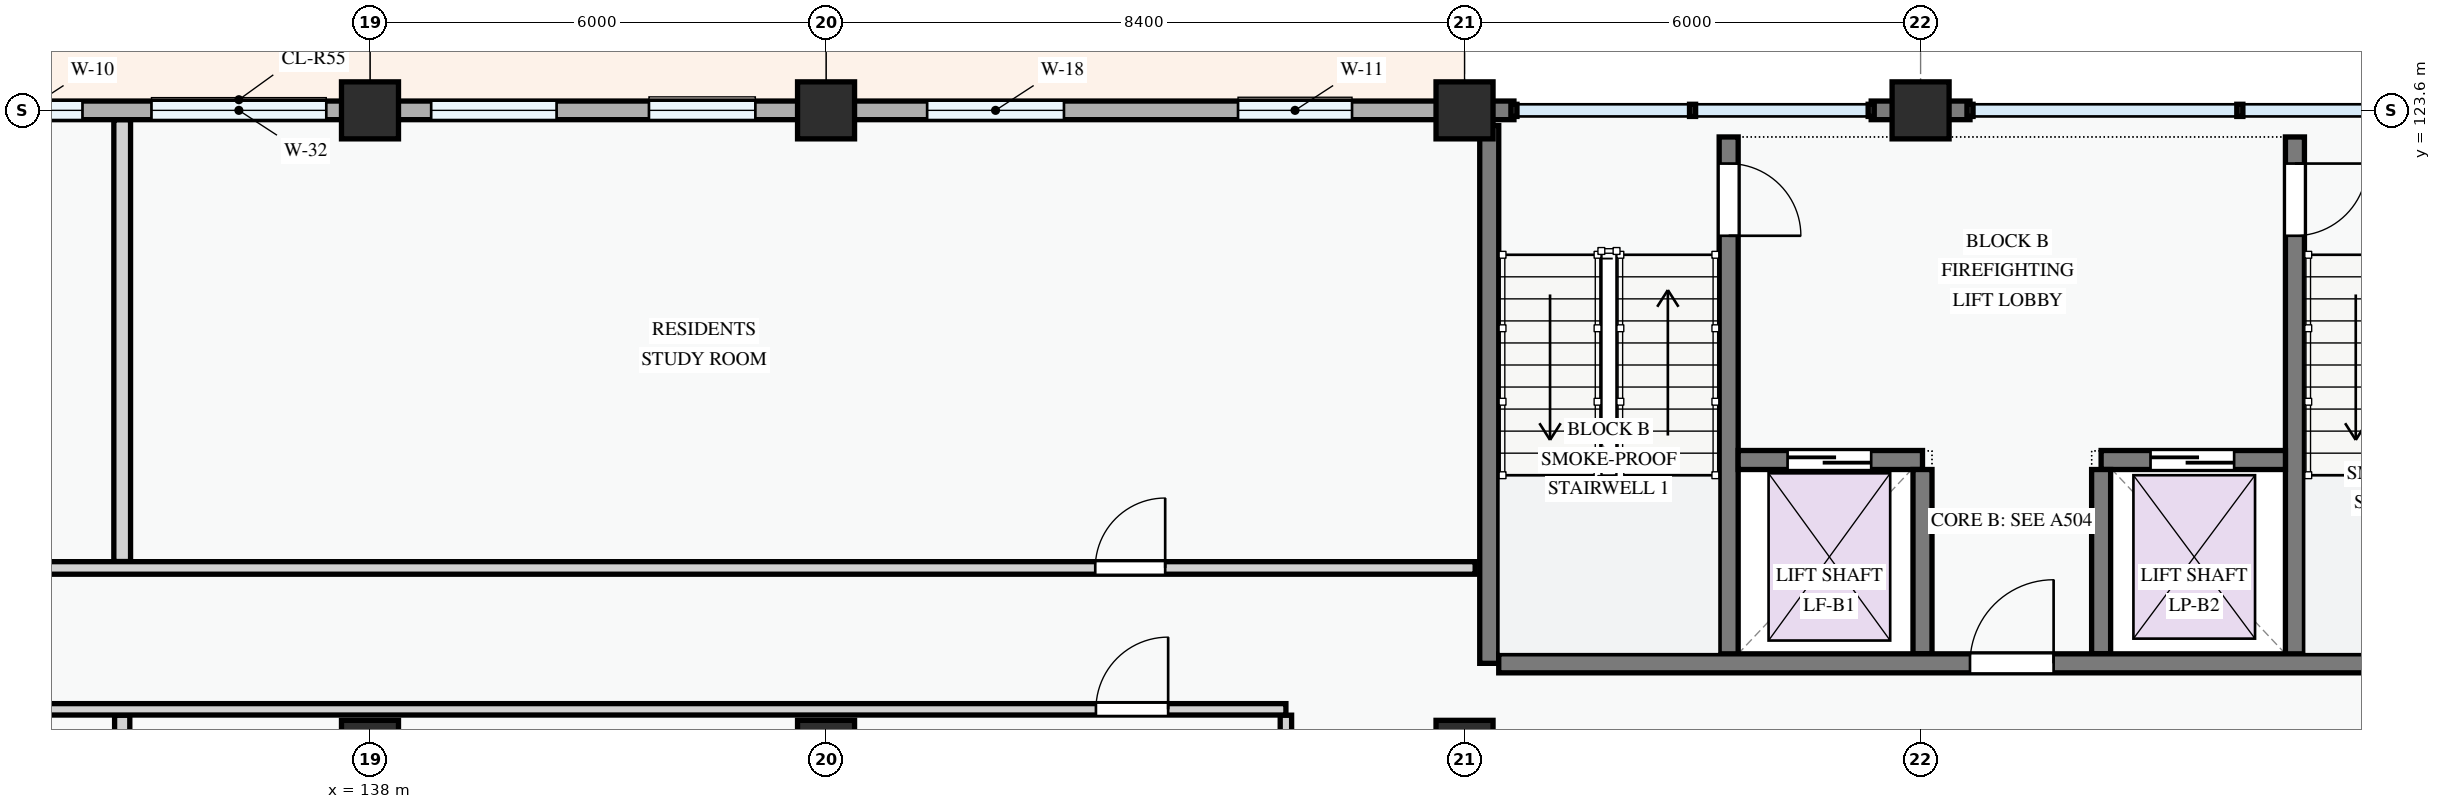
"""IFC4 building model, lengths in metres.
Left out: names, types, materials, properties, quantities, classifications, styles, units other than length and angle.
Written with IfcOpenShell. Run it as: python <this file> out.ifc"""

import sys

from ifc_helpers import new_model, si_unit, direction, frame, frame_2d, origin, origin_2d, place, context, subcontext, project, spatial, rectangle, extrude, element, fill, save


model = new_model("IFC4")
c1 = context("Model", 3, precision=1e-05, world=origin(), true_north=direction((0.0, 1.0)))
c2 = subcontext(c1, "Body", "Model", "MODEL_VIEW")
j1 = project(units=[si_unit("LENGTHUNIT", "METRE"), si_unit("PLANEANGLEUNIT", "RADIAN")], contexts=[c1])
p1 = place(None, origin())
s1 = spatial("IfcSite", under=j1, at=p1, CompositionType="ELEMENT")
p2 = place(p1, origin())
s2 = spatial("IfcBuilding", under=s1, at=p2, CompositionType="ELEMENT")
p3 = place(p2, frame((0.0, 0.0, 4.5)))
s3 = spatial("IfcBuildingStorey", under=s2, at=p3, CompositionType="ELEMENT", Elevation=4.5)
for number, where, z_axis, x_axis in (
    (1, (138.0, 115.2, 0.0), (0.0, 0.0, 1.0), (1.0, 0.0, 0.0)),
    (2, (138.0, 123.6, 0.0), (0.0, 0.0, 1.0), (1.0, 0.0, 0.0)),
    (3, (144.0, 115.2, 0.0), (0.0, 0.0, 1.0), (1.0, 0.0, 0.0)),
    (4, (144.0, 123.6, 0.0), (0.0, 0.0, 1.0), (1.0, 0.0, 0.0)),
    (5, (152.4, 115.2, 0.0), (0.0, 0.0, 1.0), (1.0, 0.0, 0.0)),
    (6, (152.4, 123.6, 0.0), (0.0, 0.0, 1.0), (1.0, 0.0, 0.0)),
    (7, (158.4, 123.6, 0.0), (0.0, 0.0, 1.0), (1.0, 0.0, 0.0)),
):
    element("IfcColumn", number, at=place(p3, frame(where, z_axis=z_axis, x_axis=x_axis)), inside=s3, PredefinedType="COLUMN", context=c2, shape_type="SweptSolid", body=[
        extrude(rectangle(XDim=0.75, YDim=0.75, at=origin_2d()), origin(), (0.0, 0.0, 1.0), 3.6),
    ])
p4 = place(p3, frame((159.05, 123.6, 0.0), z_axis=(0.0, 0.0, 1.0), x_axis=(-1.0, 0.0, 0.0)))
e8 = element("IfcWall", 8, at=p4, inside=s3, PredefinedType="STANDARD", context=c2, shape_type="SweptSolid", body=[
    extrude(rectangle(XDim=0.65, YDim=0.245, at=frame_2d((0.325, 0.0))), origin(), (0.0, 0.0, 1.0), 3.34),
])
p5 = place(p3, frame((158.4, 123.6, 0.0), z_axis=(0.0, 0.0, 1.0), x_axis=(-1.0, 0.0, 0.0)))
e9 = element("IfcWall", 9, at=p5, inside=s3, PredefinedType="STANDARD", context=c2, shape_type="SweptSolid", body=[
    extrude(rectangle(XDim=0.65, YDim=0.245, at=frame_2d((0.325, 0.0))), origin(), (0.0, 0.0, 1.0), 3.34),
])
p6 = place(p3, frame((153.05, 123.6, 0.0), z_axis=(0.0, 0.0, 1.0), x_axis=(-1.0, 0.0, 0.0)))
e10 = element("IfcWall", 10, at=p6, inside=s3, PredefinedType="STANDARD", context=c2, shape_type="SweptSolid", body=[
    extrude(rectangle(XDim=0.65, YDim=0.245, at=frame_2d((0.325, 0.0))), origin(), (0.0, 0.0, 1.0), 3.34),
])
p7 = place(p3, frame((152.4, 123.6, 0.0), z_axis=(0.0, 0.0, 1.0), x_axis=(-1.0, 0.0, 0.0)))
e11 = element("IfcWall", 11, at=p7, inside=s3, PredefinedType="STANDARD", context=c2, shape_type="SweptSolid", body=[
    extrude(rectangle(XDim=8.4, YDim=0.245, at=frame_2d((4.2, 0.0))), origin(), (0.0, 0.0, 1.0), 2.675),
])
p8 = place(p7, frame((1.48, 0.0, 0.78)))
e12 = element("IfcOpeningElement", 12, at=p8, cuts=e11, PredefinedType="OPENING", context=c2, shape_type="SweptSolid", body=[
    extrude(rectangle(XDim=1.5, YDim=1.65, at=frame_2d((0.75, 0.825))), frame((0.0, 0.133, 0.0), z_axis=(0.0, -1.0, 0.0), x_axis=(1.0, 0.0, 0.0)), (0.0, 0.0, 1.0), 0.265),
])
p9 = place(p7, frame((5.27, 0.0, 0.78)))
e13 = element("IfcOpeningElement", 13, at=p9, cuts=e11, PredefinedType="OPENING", context=c2, shape_type="SweptSolid", body=[
    extrude(rectangle(XDim=1.8, YDim=1.5, at=frame_2d((0.9, 0.75))), frame((0.0, 0.133, 0.0), z_axis=(0.0, -1.0, 0.0), x_axis=(1.0, 0.0, 0.0)), (0.0, 0.0, 1.0), 0.265),
])
p10 = place(p3, frame((144.0, 123.6, 0.0), z_axis=(0.0, 0.0, 1.0), x_axis=(-1.0, 0.0, 0.0)))
e14 = element("IfcWall", 14, at=p10, inside=s3, PredefinedType="STANDARD", context=c2, shape_type="SweptSolid", body=[
    extrude(rectangle(XDim=6.0, YDim=0.245, at=frame_2d((3.0, 0.0))), origin(), (0.0, 0.0, 1.0), 2.775),
])
p11 = place(p10, frame((0.93, 0.0, 0.78)))
e15 = element("IfcOpeningElement", 15, at=p11, cuts=e14, PredefinedType="OPENING", context=c2, shape_type="SweptSolid", body=[
    extrude(rectangle(XDim=1.4, YDim=1.45, at=frame_2d((0.7, 0.725))), frame((0.0, 0.133, 0.0), z_axis=(0.0, -1.0, 0.0), x_axis=(1.0, 0.0, 0.0)), (0.0, 0.0, 1.0), 0.265),
])
p12 = place(p10, frame((3.545, 0.0, 0.78)))
e16 = element("IfcOpeningElement", 16, at=p12, cuts=e14, PredefinedType="OPENING", context=c2, shape_type="SweptSolid", body=[
    extrude(rectangle(XDim=1.65, YDim=1.5, at=frame_2d((0.825, 0.75))), frame((0.0, 0.133, 0.0), z_axis=(0.0, -1.0, 0.0), x_axis=(1.0, 0.0, 0.0)), (0.0, 0.0, 1.0), 0.265),
])
p13 = place(p3, frame((138.0, 123.6, 0.0), z_axis=(0.0, 0.0, 1.0), x_axis=(-1.0, 0.0, 0.0)))
e17 = element("IfcWall", 17, at=p13, inside=s3, PredefinedType="STANDARD", context=c2, shape_type="SweptSolid", body=[
    extrude(rectangle(XDim=8.4, YDim=0.245, at=frame_2d((4.2, 0.0))), origin(), (0.0, 0.0, 1.0), 2.675),
])
p14 = place(p13, frame((0.575, 0.0, 0.78)))
e18 = element("IfcOpeningElement", 18, at=p14, cuts=e17, PredefinedType="OPENING", context=c2, shape_type="SweptSolid", body=[
    extrude(rectangle(XDim=2.3, YDim=1.7, at=frame_2d((1.15, 0.85))), frame((0.0, 0.133, 0.0), z_axis=(0.0, -1.0, 0.0), x_axis=(1.0, 0.0, 0.0)), (0.0, 0.0, 1.0), 0.265),
])
p15 = place(p13, frame((3.782, 0.0, 0.78)))
e19 = element("IfcOpeningElement", 19, at=p15, cuts=e17, PredefinedType="OPENING", context=c2, shape_type="SweptSolid", body=[
    extrude(rectangle(XDim=1.5, YDim=1.5, at=frame_2d((0.75, 0.75))), frame((0.0, 0.133, 0.0), z_axis=(0.0, -1.0, 0.0), x_axis=(1.0, 0.0, 0.0)), (0.0, 0.0, 1.0), 0.265),
])
p16 = place(p13, frame((6.062, 0.0, 0.78)))
e20 = element("IfcOpeningElement", 20, at=p16, cuts=e17, PredefinedType="OPENING", context=c2, shape_type="SweptSolid", body=[
    extrude(rectangle(XDim=1.75, YDim=1.45, at=frame_2d((0.875, 0.725))), frame((0.0, 0.133, 0.0), z_axis=(0.0, -1.0, 0.0), x_axis=(1.0, 0.0, 0.0)), (0.0, 0.0, 1.0), 0.265),
])
p17 = place(p3, frame((155.875, 123.25, 0.0), z_axis=(0.0, 0.0, 1.0), x_axis=(0.0, -1.0, 0.0)))
e21 = element("IfcWall", 21, at=p17, inside=s3, PredefinedType="SHEAR", context=c2, shape_type="SweptSolid", body=[
    extrude(rectangle(XDim=6.925, YDim=0.25, at=frame_2d((3.462, 0.0))), origin(), (0.0, 0.0, 1.0), 3.3),
])
p18 = place(p17, frame((0.35, 0.0, 0.0)))
e22 = element("IfcOpeningElement", 22, at=p18, cuts=e21, PredefinedType="OPENING", context=c2, shape_type="SweptSolid", body=[
    extrude(rectangle(XDim=0.95, YDim=2.1, at=frame_2d((0.475, 1.05))), frame((0.0, 0.135, 0.0), z_axis=(0.0, -1.0, 0.0), x_axis=(1.0, 0.0, 0.0)), (0.0, 0.0, 1.0), 0.27),
])
p19 = place(p3, frame((152.725, 123.4, 0.0), z_axis=(0.0, 0.0, 1.0), x_axis=(0.0, -1.0, 0.0)))
e23 = element("IfcWall", 23, at=p19, inside=s3, PredefinedType="SHEAR", context=c2, shape_type="SweptSolid", body=[
    extrude(rectangle(XDim=7.075, YDim=0.25, at=frame_2d((3.538, 0.0))), origin(), (0.0, 0.0, 1.0), 3.3),
])
p20 = place(p3, frame((163.325, 123.25, 0.0), z_axis=(0.0, 0.0, 1.0), x_axis=(0.0, -1.0, 0.0)))
e24 = element("IfcWall", 24, at=p20, inside=s3, PredefinedType="SHEAR", context=c2, shape_type="SweptSolid", body=[
    extrude(rectangle(XDim=6.925, YDim=0.25, at=frame_2d((3.462, 0.0))), origin(), (0.0, 0.0, 1.0), 3.3),
])
p21 = place(p20, frame((0.35, 0.0, 0.0)))
e25 = element("IfcOpeningElement", 25, at=p21, cuts=e24, PredefinedType="OPENING", context=c2, shape_type="SweptSolid", body=[
    extrude(rectangle(XDim=0.95, YDim=2.1, at=frame_2d((0.475, 1.05))), frame((0.0, 0.135, 0.0), z_axis=(0.0, -1.0, 0.0), x_axis=(1.0, 0.0, 0.0)), (0.0, 0.0, 1.0), 0.27),
])
p22 = place(p3, frame((156.0, 119.0, 0.0), z_axis=(0.0, 0.0, 1.0), x_axis=(1.0, 0.0, 0.0)))
e26 = element("IfcWall", 26, at=p22, inside=s3, PredefinedType="SHEAR", context=c2, shape_type="SweptSolid", body=[
    extrude(rectangle(XDim=2.425, YDim=0.25, at=frame_2d((1.212, 0.0))), origin(), (0.0, 0.0, 1.0), 3.3),
])
p23 = place(p22, frame((0.65, 0.0, 0.0)))
e27 = element("IfcOpeningElement", 27, at=p23, cuts=e26, PredefinedType="OPENING", context=c2, shape_type="SweptSolid", body=[
    extrude(rectangle(XDim=1.1, YDim=2.15, at=frame_2d((0.55, 1.075))), frame((0.0, 0.135, 0.0), z_axis=(0.0, -1.0, 0.0), x_axis=(1.0, 0.0, 0.0)), (0.0, 0.0, 1.0), 0.27),
])
p24 = place(p3, frame((160.775, 119.0, 0.0), z_axis=(0.0, 0.0, 1.0), x_axis=(1.0, 0.0, 0.0)))
e28 = element("IfcWall", 28, at=p24, inside=s3, PredefinedType="SHEAR", context=c2, shape_type="SweptSolid", body=[
    extrude(rectangle(XDim=2.425, YDim=0.25, at=frame_2d((1.212, 0.0))), origin(), (0.0, 0.0, 1.0), 3.3),
])
p25 = place(p24, frame((0.65, 0.0, 0.0)))
e29 = element("IfcOpeningElement", 29, at=p25, cuts=e28, PredefinedType="OPENING", context=c2, shape_type="SweptSolid", body=[
    extrude(rectangle(XDim=1.1, YDim=2.15, at=frame_2d((0.55, 1.075))), frame((0.0, 0.135, 0.0), z_axis=(0.0, -1.0, 0.0), x_axis=(1.0, 0.0, 0.0)), (0.0, 0.0, 1.0), 0.27),
])
for number, where, z_axis, x_axis in (
    (30, (158.425, 118.875, 0.0), (0.0, 0.0, 1.0), (0.0, -1.0, 0.0)),
    (31, (160.775, 118.875, 0.0), (0.0, 0.0, 1.0), (0.0, -1.0, 0.0)),
):
    element("IfcWall", number, at=place(p3, frame(where, z_axis=z_axis, x_axis=x_axis)), inside=s3, PredefinedType="SHEAR", context=c2, shape_type="SweptSolid", body=[
        extrude(rectangle(XDim=2.425, YDim=0.25, at=frame_2d((1.212, 0.0))), origin(), (0.0, 0.0, 1.0), 3.3),
    ])
p26 = place(p3, frame((152.85, 116.325, 0.0), z_axis=(0.0, 0.0, 1.0), x_axis=(1.0, 0.0, 0.0)))
e32 = element("IfcWall", 32, at=p26, inside=s3, PredefinedType="SHEAR", context=c2, shape_type="SweptSolid", body=[
    extrude(rectangle(XDim=13.5, YDim=0.25, at=frame_2d((6.75, 0.0))), origin(), (0.0, 0.0, 1.0), 3.3),
])
p27 = place(p26, frame((6.2, 0.0, 0.0)))
e33 = element("IfcOpeningElement", 33, at=p27, cuts=e32, PredefinedType="OPENING", context=c2, shape_type="SweptSolid", body=[
    extrude(rectangle(XDim=1.1, YDim=2.15, at=frame_2d((0.55, 1.075))), frame((0.0, 0.135, 0.0), z_axis=(0.0, -1.0, 0.0), x_axis=(1.0, 0.0, 0.0)), (0.0, 0.0, 1.0), 0.27),
])
p28 = place(p3, frame((150.05, 109.324, 0.0), z_axis=(0.0, 0.0, 1.0), x_axis=(0.0, 1.0, 0.0)))
e34 = element("IfcWall", 34, at=p28, inside=s3, PredefinedType="PARTITIONING", context=c2, shape_type="SweptSolid", body=[
    extrude(rectangle(XDim=6.319, YDim=0.15, at=frame_2d((3.159, 0.0))), origin(), (0.0, 0.0, 1.0), 3.3),
])
p29 = place(p3, frame((134.74, 109.324, 0.0), z_axis=(0.0, 0.0, 1.0), x_axis=(0.0, 1.0, 0.0)))
e35 = element("IfcWall", 35, at=p29, inside=s3, PredefinedType="PARTITIONING", context=c2, shape_type="SweptSolid", body=[
    extrude(rectangle(XDim=6.319, YDim=0.2, at=frame_2d((3.159, 0.0))), origin(), (0.0, 0.0, 1.0), 3.3),
])
p30 = place(p3, frame((134.74, 117.665, 0.0), z_axis=(0.0, 0.0, 1.0), x_axis=(0.0, 1.0, 0.0)))
e36 = element("IfcWall", 36, at=p30, inside=s3, PredefinedType="PARTITIONING", context=c2, shape_type="SweptSolid", body=[
    extrude(rectangle(XDim=5.811, YDim=0.22, at=frame_2d((2.906, 0.0))), origin(), (0.0, 0.0, 1.0), 3.3),
])
p31 = place(p3, frame((80.524, 115.72, 0.0), z_axis=(0.0, 0.0, 1.0), x_axis=(1.0, 0.0, 0.0)))
e37 = element("IfcWall", 37, at=p31, inside=s3, PredefinedType="PARTITIONING", context=c2, shape_type="SweptSolid", body=[
    extrude(rectangle(XDim=69.526, YDim=0.15, at=frame_2d((34.763, 0.0))), origin(), (0.0, 0.0, 1.0), 3.3),
])
p32 = place(p31, frame((9.656, 0.0, 0.0)))
e38 = element("IfcOpeningElement", 38, at=p32, cuts=e37, PredefinedType="OPENING", context=c2, shape_type="SweptSolid", body=[
    extrude(rectangle(XDim=0.95, YDim=2.1, at=frame_2d((0.475, 1.05))), frame((0.0, 0.085, 0.0), z_axis=(0.0, -1.0, 0.0), x_axis=(1.0, 0.0, 0.0)), (0.0, 0.0, 1.0), 0.17),
])
p33 = place(p31, frame((24.2, 0.0, 0.0)))
e39 = element("IfcOpeningElement", 39, at=p33, cuts=e37, PredefinedType="OPENING", context=c2, shape_type="SweptSolid", body=[
    extrude(rectangle(XDim=0.95, YDim=2.1, at=frame_2d((0.475, 1.05))), frame((0.0, 0.085, 0.0), z_axis=(0.0, -1.0, 0.0), x_axis=(1.0, 0.0, 0.0)), (0.0, 0.0, 1.0), 0.17),
])
p34 = place(p31, frame((38.208, 0.0, 0.0)))
e40 = element("IfcOpeningElement", 40, at=p34, cuts=e37, PredefinedType="OPENING", context=c2, shape_type="SweptSolid", body=[
    extrude(rectangle(XDim=0.95, YDim=2.1, at=frame_2d((0.475, 1.05))), frame((0.0, 0.085, 0.0), z_axis=(0.0, -1.0, 0.0), x_axis=(1.0, 0.0, 0.0)), (0.0, 0.0, 1.0), 0.17),
])
p35 = place(p31, frame((67.026, 0.0, 0.0)))
e41 = element("IfcOpeningElement", 41, at=p35, cuts=e37, PredefinedType="OPENING", context=c2, shape_type="SweptSolid", body=[
    extrude(rectangle(XDim=0.95, YDim=2.1, at=frame_2d((0.475, 1.05))), frame((0.0, 0.085, 0.0), z_axis=(0.0, -1.0, 0.0), x_axis=(1.0, 0.0, 0.0)), (0.0, 0.0, 1.0), 0.17),
])
p36 = place(p3, frame((80.524, 117.58, 0.0), z_axis=(0.0, 0.0, 1.0), x_axis=(1.0, 0.0, 0.0)))
e42 = element("IfcWall", 42, at=p36, inside=s3, PredefinedType="PARTITIONING", context=c2, shape_type="SweptSolid", body=[
    extrude(rectangle(XDim=72.016, YDim=0.165, at=frame_2d((36.008, 0.0))), origin(), (0.0, 0.0, 1.0), 3.3),
])
p37 = place(p36, frame((9.65, 0.0, 0.0)))
e43 = element("IfcOpeningElement", 43, at=p37, cuts=e42, PredefinedType="OPENING", context=c2, shape_type="SweptSolid", body=[
    extrude(rectangle(XDim=0.92, YDim=2.1, at=frame_2d((0.46, 1.05))), frame((0.0, 0.093, 0.0), z_axis=(0.0, -1.0, 0.0), x_axis=(1.0, 0.0, 0.0)), (0.0, 0.0, 1.0), 0.185),
])
p38 = place(p36, frame((24.197, 0.0, 0.0)))
e44 = element("IfcOpeningElement", 44, at=p38, cuts=e42, PredefinedType="OPENING", context=c2, shape_type="SweptSolid", body=[
    extrude(rectangle(XDim=0.96, YDim=2.12, at=frame_2d((0.48, 1.06))), frame((0.0, 0.093, 0.0), z_axis=(0.0, -1.0, 0.0), x_axis=(1.0, 0.0, 0.0)), (0.0, 0.0, 1.0), 0.185),
])
p39 = place(p36, frame((38.206, 0.0, 0.0)))
e45 = element("IfcOpeningElement", 45, at=p39, cuts=e42, PredefinedType="OPENING", context=c2, shape_type="SweptSolid", body=[
    extrude(rectangle(XDim=0.92, YDim=2.1, at=frame_2d((0.46, 1.05))), frame((0.0, 0.093, 0.0), z_axis=(0.0, -1.0, 0.0), x_axis=(1.0, 0.0, 0.0)), (0.0, 0.0, 1.0), 0.185),
])
p40 = place(p36, frame((67.017, 0.0, 0.0)))
e46 = element("IfcOpeningElement", 46, at=p40, cuts=e42, PredefinedType="OPENING", context=c2, shape_type="SweptSolid", body=[
    extrude(rectangle(XDim=0.92, YDim=2.1, at=frame_2d((0.46, 1.05))), frame((0.0, 0.093, 0.0), z_axis=(0.0, -1.0, 0.0), x_axis=(1.0, 0.0, 0.0)), (0.0, 0.0, 1.0), 0.185),
])
p41 = place(p8, origin())
e47 = element("IfcWindow", 47, at=p41, inside=s3, PartitioningType="SINGLE_PANEL", PredefinedType="WINDOW", context=c2, shape_type="SweptSolid", body=[
    extrude(rectangle(XDim=1.5, YDim=1.65, at=frame_2d((0.75, 0.825))), frame((0.0, 0.03, 0.0), z_axis=(0.0, -1.0, 0.0), x_axis=(1.0, 0.0, 0.0)), (0.0, 0.0, 1.0), 0.06),
])
fill(e12, e47)
p42 = place(p9, origin())
e48 = element("IfcWindow", 48, at=p42, inside=s3, PartitioningType="DOUBLE_PANEL_VERTICAL", PredefinedType="WINDOW", context=c2, shape_type="SweptSolid", body=[
    extrude(rectangle(XDim=1.8, YDim=1.5, at=frame_2d((0.9, 0.75))), frame((0.0, 0.03, 0.0), z_axis=(0.0, -1.0, 0.0), x_axis=(1.0, 0.0, 0.0)), (0.0, 0.0, 1.0), 0.06),
])
fill(e13, e48)
p43 = place(p11, origin())
e49 = element("IfcWindow", 49, at=p43, inside=s3, PartitioningType="SINGLE_PANEL", PredefinedType="WINDOW", context=c2, shape_type="SweptSolid", body=[
    extrude(rectangle(XDim=1.4, YDim=1.45, at=frame_2d((0.7, 0.725))), frame((0.0, 0.03, 0.0), z_axis=(0.0, -1.0, 0.0), x_axis=(1.0, 0.0, 0.0)), (0.0, 0.0, 1.0), 0.06),
])
fill(e15, e49)
p44 = place(p12, origin())
e50 = element("IfcWindow", 50, at=p44, inside=s3, PartitioningType="DOUBLE_PANEL_VERTICAL", PredefinedType="WINDOW", context=c2, shape_type="SweptSolid", body=[
    extrude(rectangle(XDim=1.65, YDim=1.5, at=frame_2d((0.825, 0.75))), frame((0.0, 0.03, 0.0), z_axis=(0.0, -1.0, 0.0), x_axis=(1.0, 0.0, 0.0)), (0.0, 0.0, 1.0), 0.06),
])
fill(e16, e50)
p45 = place(p14, origin())
e51 = element("IfcWindow", 51, at=p45, inside=s3, PartitioningType="DOUBLE_PANEL_VERTICAL", PredefinedType="WINDOW", context=c2, shape_type="SweptSolid", body=[
    extrude(rectangle(XDim=2.3, YDim=1.7, at=frame_2d((1.15, 0.85))), frame((0.0, 0.03, 0.0), z_axis=(0.0, -1.0, 0.0), x_axis=(1.0, 0.0, 0.0)), (0.0, 0.0, 1.0), 0.06),
])
fill(e18, e51)
p46 = place(p15, origin())
e52 = element("IfcWindow", 52, at=p46, inside=s3, PartitioningType="SINGLE_PANEL", PredefinedType="WINDOW", context=c2, shape_type="SweptSolid", body=[
    extrude(rectangle(XDim=1.5, YDim=1.5, at=frame_2d((0.75, 0.75))), frame((0.0, 0.03, 0.0), z_axis=(0.0, -1.0, 0.0), x_axis=(1.0, 0.0, 0.0)), (0.0, 0.0, 1.0), 0.06),
])
fill(e19, e52)
p47 = place(p18, origin())
e53 = element("IfcDoor", 53, at=p47, inside=s3, OperationType="SINGLE_SWING_RIGHT", PredefinedType="DOOR", context=c2, shape_type="SweptSolid", body=[
    extrude(rectangle(XDim=0.95, YDim=2.1, at=frame_2d((0.475, 1.05))), frame((0.0, 0.025, 0.0), z_axis=(0.0, -1.0, 0.0), x_axis=(1.0, 0.0, 0.0)), (0.0, 0.0, 1.0), 0.05),
])
fill(e22, e53)
p48 = place(p21, origin())
e54 = element("IfcDoor", 54, at=p48, inside=s3, OperationType="SINGLE_SWING_LEFT", PredefinedType="DOOR", context=c2, shape_type="SweptSolid", body=[
    extrude(rectangle(XDim=0.95, YDim=2.1, at=frame_2d((0.475, 1.05))), frame((0.0, 0.025, 0.0), z_axis=(0.0, -1.0, 0.0), x_axis=(1.0, 0.0, 0.0)), (0.0, 0.0, 1.0), 0.05),
])
fill(e25, e54)
p49 = place(p23, origin())
e55 = element("IfcDoor", 55, at=p49, inside=s3, OperationType="SLIDING_TO_LEFT", PredefinedType="DOOR", context=c2, shape_type="SweptSolid", body=[
    extrude(rectangle(XDim=1.1, YDim=2.15, at=frame_2d((0.55, 1.075))), frame((0.0, 0.025, 0.0), z_axis=(0.0, -1.0, 0.0), x_axis=(1.0, 0.0, 0.0)), (0.0, 0.0, 1.0), 0.05),
])
fill(e27, e55)
p50 = place(p25, origin())
e56 = element("IfcDoor", 56, at=p50, inside=s3, OperationType="SLIDING_TO_LEFT", PredefinedType="DOOR", context=c2, shape_type="SweptSolid", body=[
    extrude(rectangle(XDim=1.1, YDim=2.15, at=frame_2d((0.55, 1.075))), frame((0.0, 0.025, 0.0), z_axis=(0.0, -1.0, 0.0), x_axis=(1.0, 0.0, 0.0)), (0.0, 0.0, 1.0), 0.05),
])
fill(e29, e56)
p51 = place(p27, origin())
e57 = element("IfcDoor", 57, at=p51, inside=s3, OperationType="SINGLE_SWING_RIGHT", PredefinedType="DOOR", context=c2, shape_type="SweptSolid", body=[
    extrude(rectangle(XDim=1.1, YDim=2.15, at=frame_2d((0.55, 1.075))), frame((0.0, 0.025, 0.0), z_axis=(0.0, -1.0, 0.0), x_axis=(1.0, 0.0, 0.0)), (0.0, 0.0, 1.0), 0.05),
])
fill(e33, e57)
p52 = place(p35, origin())
e58 = element("IfcDoor", 58, at=p52, inside=s3, OperationType="SINGLE_SWING_RIGHT", PredefinedType="DOOR", context=c2, shape_type="SweptSolid", body=[
    extrude(rectangle(XDim=0.95, YDim=2.1, at=frame_2d((0.475, 1.05))), frame((0.0, 0.025, 0.0), z_axis=(0.0, -1.0, 0.0), x_axis=(1.0, 0.0, 0.0)), (0.0, 0.0, 1.0), 0.05),
])
fill(e41, e58)
p53 = place(p40, origin())
e59 = element("IfcDoor", 59, at=p53, inside=s3, OperationType="SINGLE_SWING_RIGHT", PredefinedType="DOOR", context=c2, shape_type="SweptSolid", body=[
    extrude(rectangle(XDim=0.92, YDim=2.1, at=frame_2d((0.46, 1.05))), frame((0.0, 0.025, 0.0), z_axis=(0.0, -1.0, 0.0), x_axis=(1.0, 0.0, 0.0)), (0.0, 0.0, 1.0), 0.05),
])
fill(e46, e59)
save(model, sys.argv[1])
